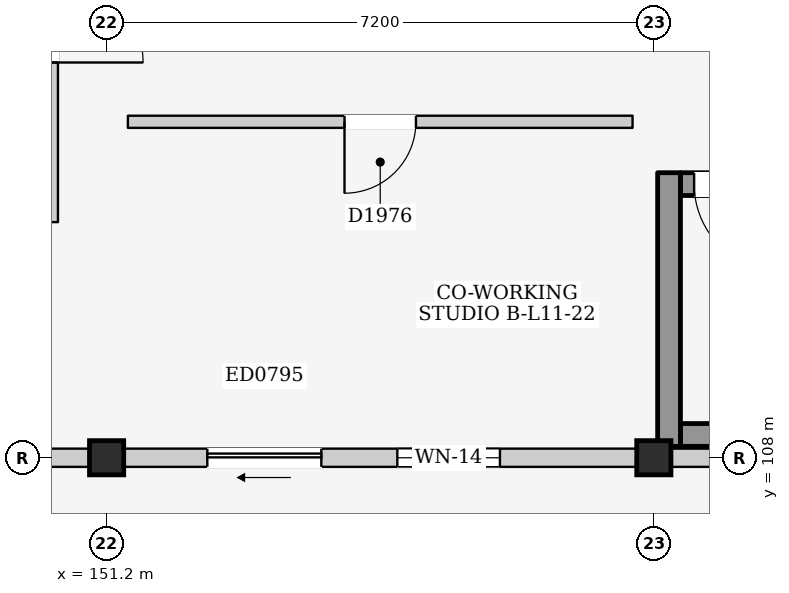
"""IFC4 building model, lengths in metres.
Left out: names, types, materials, properties, quantities, classifications, styles, units other than length and angle.
Written with IfcOpenShell. Run it as: python <this file> out.ifc"""

import sys

from ifc_helpers import new_model, si_unit, direction, frame, frame_2d, origin, origin_2d, place, context, subcontext, project, spatial, rectangle, extrude, element, fill, save


model = new_model("IFC4")
c1 = context("Model", 3, precision=1e-05, world=origin(), true_north=direction((0.0, 1.0)))
c2 = subcontext(c1, "Body", "Model", "MODEL_VIEW")
j1 = project(units=[si_unit("LENGTHUNIT", "METRE"), si_unit("PLANEANGLEUNIT", "RADIAN")], contexts=[c1])
p1 = place(None, origin())
s1 = spatial("IfcSite", under=j1, at=p1, CompositionType="ELEMENT")
p2 = place(p1, origin())
s2 = spatial("IfcBuilding", under=s1, at=p2, CompositionType="ELEMENT")
p3 = place(p2, frame((0.0, 0.0, 38.0)))
s3 = spatial("IfcBuildingStorey", under=s2, at=p3, CompositionType="ELEMENT", Elevation=38.0)
for number, where, z_axis, x_axis in (
    (1, (151.2, 108.0, 0.0), (0.0, 0.0, 1.0), (1.0, 0.0, 0.0)),
    (2, (158.4, 108.0, 0.0), (0.0, 0.0, 1.0), (1.0, 0.0, 0.0)),
):
    element("IfcColumn", number, at=place(p3, frame(where, z_axis=z_axis, x_axis=x_axis)), inside=s3, PredefinedType="COLUMN", context=c2, shape_type="SweptSolid", body=[
        extrude(rectangle(XDim=0.45, YDim=0.45, at=origin_2d()), origin(), (0.0, 0.0, 1.0), 3.2),
    ])
p4 = place(p3, frame((144.225, 108.0, 0.0), z_axis=(0.0, 0.0, 1.0), x_axis=(1.0, 0.0, 0.0)))
e3 = element("IfcWall", 3, at=p4, inside=s3, PredefinedType="ELEMENTEDWALL", context=c2, shape_type="SweptSolid", body=[
    extrude(rectangle(XDim=6.75, YDim=0.24, at=frame_2d((3.375, 0.0))), origin(), (0.0, 0.0, 1.0), 2.375),
])
p5 = place(p4, frame((2.875, 0.0, 1.2)))
e4 = element("IfcOpeningElement", 4, at=p5, cuts=e3, PredefinedType="OPENING", context=c2, shape_type="SweptSolid", body=[
    extrude(rectangle(XDim=1.0, YDim=0.9, at=frame_2d((0.5, 0.45))), frame((0.0, 0.135, 0.0), z_axis=(0.0, -1.0, 0.0), x_axis=(1.0, 0.0, 0.0)), (0.0, 0.0, 1.0), 0.27),
])
p6 = place(p3, frame((151.425, 108.0, 0.0), z_axis=(0.0, 0.0, 1.0), x_axis=(1.0, 0.0, 0.0)))
e5 = element("IfcWall", 5, at=p6, inside=s3, PredefinedType="ELEMENTEDWALL", context=c2, shape_type="SweptSolid", body=[
    extrude(rectangle(XDim=6.75, YDim=0.24, at=frame_2d((3.375, 0.0))), origin(), (0.0, 0.0, 1.0), 2.375),
])
p7 = place(p6, frame((1.1, 0.0, 0.0)))
e6 = element("IfcOpeningElement", 6, at=p7, cuts=e5, PredefinedType="OPENING", context=c2, shape_type="SweptSolid", body=[
    extrude(rectangle(XDim=1.5, YDim=2.12, at=frame_2d((0.75, 1.06))), frame((0.0, 0.135, 0.0), z_axis=(0.0, -1.0, 0.0), x_axis=(1.0, 0.0, 0.0)), (0.0, 0.0, 1.0), 0.27),
])
p8 = place(p6, frame((3.6, 0.0, 0.765)))
e7 = element("IfcOpeningElement", 7, at=p8, cuts=e5, PredefinedType="OPENING", context=c2, shape_type="SweptSolid", body=[
    extrude(rectangle(XDim=1.35, YDim=1.5, at=frame_2d((0.675, 0.75))), frame((0.0, 0.135, 0.0), z_axis=(0.0, -1.0, 0.0), x_axis=(1.0, 0.0, 0.0)), (0.0, 0.0, 1.0), 0.27),
])
p9 = place(p3, frame((158.625, 108.0, 0.0), z_axis=(0.0, 0.0, 1.0), x_axis=(1.0, 0.0, 0.0)))
e8 = element("IfcWall", 8, at=p9, inside=s3, PredefinedType="ELEMENTEDWALL", context=c2, shape_type="SweptSolid", body=[
    extrude(rectangle(XDim=6.75, YDim=0.24, at=frame_2d((3.375, 0.0))), origin(), (0.0, 0.0, 1.0), 2.375),
])
p10 = place(p9, frame((2.875, 0.0, 1.2)))
e9 = element("IfcOpeningElement", 9, at=p10, cuts=e8, PredefinedType="OPENING", context=c2, shape_type="SweptSolid", body=[
    extrude(rectangle(XDim=1.0, YDim=0.9, at=frame_2d((0.5, 0.45))), frame((0.0, 0.135, 0.0), z_axis=(0.0, -1.0, 0.0), x_axis=(1.0, 0.0, 0.0)), (0.0, 0.0, 1.0), 0.27),
])
p11 = place(p3, frame((150.48, 111.1, 0.0), z_axis=(0.0, 0.0, 1.0), x_axis=(0.0, 1.0, 0.0)))
e10 = element("IfcWall", 10, at=p11, inside=s3, PredefinedType="PARTITIONING", context=c2, shape_type="SweptSolid", body=[
    extrude(rectangle(XDim=4.02, YDim=0.16, at=frame_2d((2.01, 0.0))), origin(), (0.0, 0.0, 1.0), 2.99),
])
p12 = place(p11, frame((2.1, 0.0, 0.0)))
e11 = element("IfcOpeningElement", 11, at=p12, cuts=e10, PredefinedType="OPENING", context=c2, shape_type="SweptSolid", body=[
    extrude(rectangle(XDim=1.2, YDim=2.2, at=frame_2d((0.6, 1.1))), frame((0.0, 0.095, 0.0), z_axis=(0.0, -1.0, 0.0), x_axis=(1.0, 0.0, 0.0)), (0.0, 0.0, 1.0), 0.19),
])
p13 = place(p3, frame((158.75, 108.3, 0.0), z_axis=(0.0, 0.0, 1.0), x_axis=(1.0, 0.0, 0.0)))
e12 = element("IfcWall", 12, at=p13, inside=s3, PredefinedType="SHEAR", context=c2, shape_type="SweptSolid", body=[
    extrude(rectangle(XDim=6.5, YDim=0.3, at=frame_2d((3.25, 0.0))), origin(), (0.0, 0.0, 1.0), 2.99),
])
p14 = place(p3, frame((158.75, 111.6, 0.0), z_axis=(0.0, 0.0, 1.0), x_axis=(1.0, 0.0, 0.0)))
e13 = element("IfcWall", 13, at=p14, inside=s3, PredefinedType="SHEAR", context=c2, shape_type="SweptSolid", body=[
    extrude(rectangle(XDim=6.5, YDim=0.3, at=frame_2d((3.25, 0.0))), origin(), (0.0, 0.0, 1.0), 2.99),
])
p15 = place(p14, frame((0.18, 0.0, 0.0)))
e14 = element("IfcOpeningElement", 14, at=p15, cuts=e13, PredefinedType="OPENING", context=c2, shape_type="SweptSolid", body=[
    extrude(rectangle(XDim=1.15, YDim=2.2, at=frame_2d((0.575, 1.1))), frame((0.0, 0.165, 0.0), z_axis=(0.0, -1.0, 0.0), x_axis=(1.0, 0.0, 0.0)), (0.0, 0.0, 1.0), 0.33),
])
p16 = place(p3, frame((158.6, 108.15, 0.0), z_axis=(0.0, 0.0, 1.0), x_axis=(0.0, 1.0, 0.0)))
e15 = element("IfcWall", 15, at=p16, inside=s3, PredefinedType="SHEAR", context=c2, shape_type="SweptSolid", body=[
    extrude(rectangle(XDim=3.6, YDim=0.3, at=frame_2d((1.8, 0.0))), origin(), (0.0, 0.0, 1.0), 2.99),
])
p17 = place(p3, frame((151.48, 112.42, 0.0), z_axis=(0.0, 0.0, 1.0), x_axis=(1.0, 0.0, 0.0)))
e16 = element("IfcWall", 16, at=p17, inside=s3, PredefinedType="PARTITIONING", context=c2, shape_type="SweptSolid", body=[
    extrude(rectangle(XDim=6.64, YDim=0.16, at=frame_2d((3.32, 0.0))), origin(), (0.0, 0.0, 1.0), 2.99),
])
p18 = place(p17, frame((2.85, 0.0, 0.0)))
e17 = element("IfcOpeningElement", 17, at=p18, cuts=e16, PredefinedType="OPENING", context=c2, shape_type="SweptSolid", body=[
    extrude(rectangle(XDim=0.94, YDim=2.12, at=frame_2d((0.47, 1.06))), frame((0.0, 0.095, 0.0), z_axis=(0.0, -1.0, 0.0), x_axis=(1.0, 0.0, 0.0)), (0.0, 0.0, 1.0), 0.19),
])
p19 = place(p7, frame((1.5, 0.0, 0.0), z_axis=(0.0, 0.0, 1.0), x_axis=(-1.0, 0.0, 0.0)))
e18 = element("IfcDoor", 18, at=p19, inside=s3, OperationType="SLIDING_TO_LEFT", PredefinedType="DOOR", context=c2, shape_type="SweptSolid", body=[
    extrude(rectangle(XDim=1.5, YDim=2.12, at=frame_2d((0.75, 1.06))), frame((0.0, 0.025, 0.0), z_axis=(0.0, -1.0, 0.0), x_axis=(1.0, 0.0, 0.0)), (0.0, 0.0, 1.0), 0.05),
])
fill(e6, e18)
p20 = place(p8, origin())
e19 = element("IfcWindow", 19, at=p20, inside=s3, PartitioningType="SINGLE_PANEL", PredefinedType="WINDOW", context=c2, shape_type="SweptSolid", body=[
    extrude(rectangle(XDim=1.35, YDim=1.5, at=frame_2d((0.675, 0.75))), frame((0.0, 0.03, 0.0), z_axis=(0.0, -1.0, 0.0), x_axis=(1.0, 0.0, 0.0)), (0.0, 0.0, 1.0), 0.06),
])
fill(e7, e19)
p21 = place(p12, frame((1.2, 0.0, 0.0), z_axis=(0.0, 0.0, 1.0), x_axis=(-1.0, 0.0, 0.0)))
e20 = element("IfcDoor", 20, at=p21, inside=s3, OperationType="SINGLE_SWING_RIGHT", PredefinedType="DOOR", context=c2, shape_type="SweptSolid", body=[
    extrude(rectangle(XDim=1.2, YDim=2.2, at=frame_2d((0.6, 1.1))), frame((0.0, 0.025, 0.0), z_axis=(0.0, -1.0, 0.0), x_axis=(1.0, 0.0, 0.0)), (0.0, 0.0, 1.0), 0.05),
])
fill(e11, e20)
p22 = place(p15, frame((1.15, 0.0, 0.0), z_axis=(0.0, 0.0, 1.0), x_axis=(-1.0, 0.0, 0.0)))
e21 = element("IfcDoor", 21, at=p22, inside=s3, OperationType="SINGLE_SWING_LEFT", PredefinedType="DOOR", context=c2, shape_type="SweptSolid", body=[
    extrude(rectangle(XDim=1.15, YDim=2.2, at=frame_2d((0.575, 1.1))), frame((0.0, 0.025, 0.0), z_axis=(0.0, -1.0, 0.0), x_axis=(1.0, 0.0, 0.0)), (0.0, 0.0, 1.0), 0.05),
])
fill(e14, e21)
p23 = place(p18, frame((0.94, 0.0, 0.0), z_axis=(0.0, 0.0, 1.0), x_axis=(-1.0, 0.0, 0.0)))
e22 = element("IfcDoor", 22, at=p23, inside=s3, OperationType="SINGLE_SWING_RIGHT", PredefinedType="DOOR", context=c2, shape_type="SweptSolid", body=[
    extrude(rectangle(XDim=0.94, YDim=2.12, at=frame_2d((0.47, 1.06))), frame((0.0, 0.025, 0.0), z_axis=(0.0, -1.0, 0.0), x_axis=(1.0, 0.0, 0.0)), (0.0, 0.0, 1.0), 0.05),
])
fill(e17, e22)
save(model, sys.argv[1])
